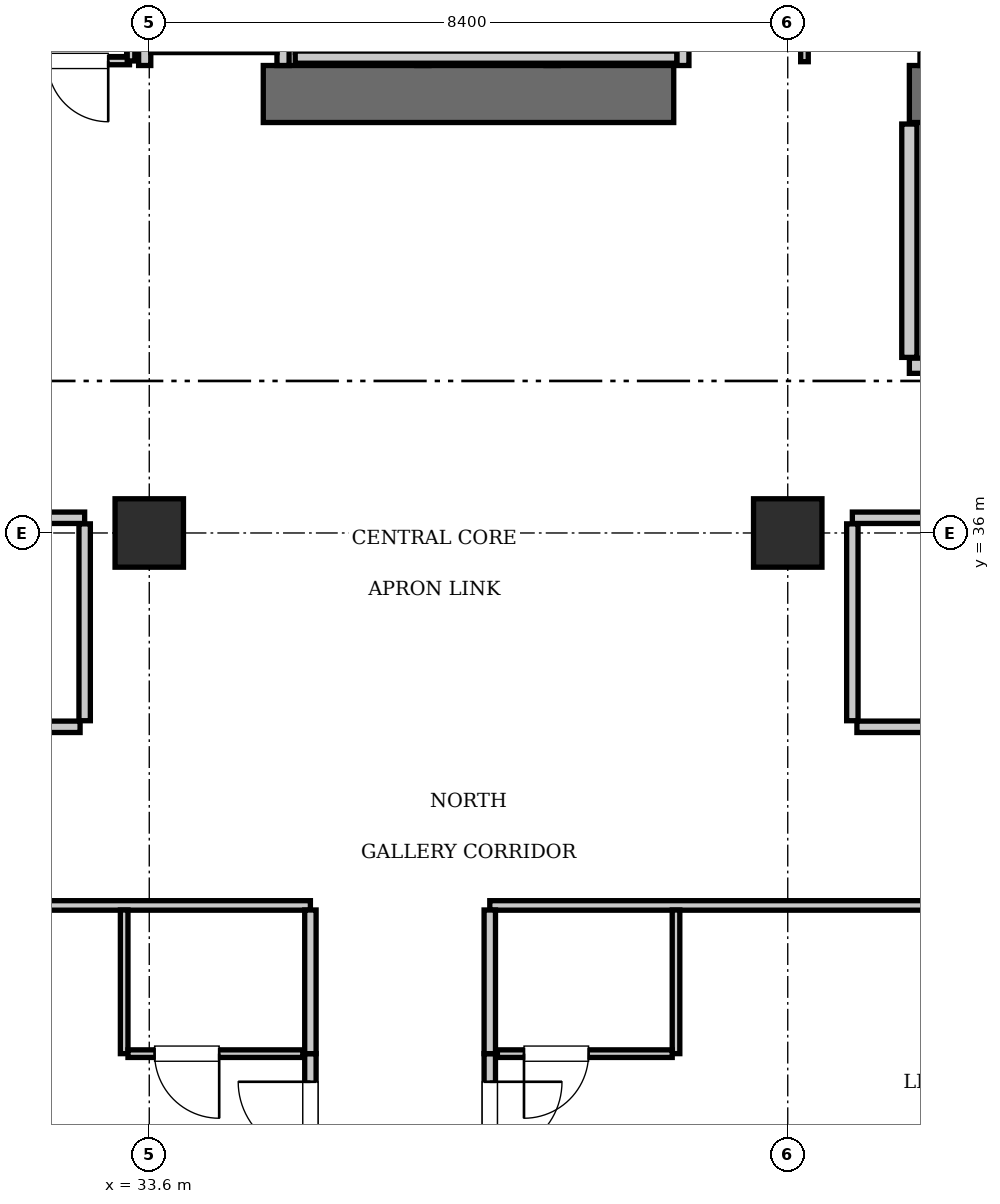
"""IFC4 building model, lengths in metres.
Left out: names, types, materials, properties, quantities, classifications, styles, units other than length and angle.
Written with IfcOpenShell. Run it as: python <this file> out.ifc"""

import sys

from ifc_helpers import new_model, si_unit, direction, frame, frame_2d, origin, origin_2d, place, context, subcontext, project, spatial, rectangle, extrude, element, fill, save


model = new_model("IFC4")
c1 = context("Model", 3, precision=1e-05, world=origin(), true_north=direction((0.0, 1.0)))
c2 = subcontext(c1, "Body", "Model", "MODEL_VIEW")
j1 = project(units=[si_unit("LENGTHUNIT", "METRE"), si_unit("PLANEANGLEUNIT", "RADIAN")], contexts=[c1])
p1 = place(None, origin())
s1 = spatial("IfcSite", under=j1, at=p1, CompositionType="ELEMENT")
p2 = place(p1, origin())
s2 = spatial("IfcBuilding", under=s1, at=p2, CompositionType="ELEMENT")
p3 = place(p2, frame((0.0, 0.0, 189.0)))
s3 = spatial("IfcBuildingStorey", under=s2, at=p3, CompositionType="ELEMENT", Elevation=189.0)
p4 = place(p3, frame((35.1, 41.775, 0.0), z_axis=(0.0, 0.0, 1.0), x_axis=(1.0, 0.0, 0.0)))
e1 = element("IfcWall", 1, at=p4, inside=s3, PredefinedType="SHEAR", context=c2, shape_type="SweptSolid", body=[
    extrude(rectangle(XDim=5.4, YDim=0.75, at=frame_2d((2.7, 0.0))), origin(), (0.0, 0.0, 1.0), 3.85),
])
p5 = place(p3, frame((43.6, 41.775, 0.0), z_axis=(0.0, 0.0, 1.0), x_axis=(1.0, 0.0, 0.0)))
e2 = element("IfcWall", 2, at=p5, inside=s3, PredefinedType="SHEAR", context=c2, shape_type="SweptSolid", body=[
    extrude(rectangle(XDim=6.8, YDim=0.75, at=frame_2d((3.4, 0.0))), origin(), (0.0, 0.0, 1.0), 3.85),
])
p6 = place(p5, frame((3.9, 0.0, 0.0)))
e3 = element("IfcOpeningElement", 3, at=p6, cuts=e2, PredefinedType="OPENING", context=c2, shape_type="SweptSolid", body=[
    extrude(rectangle(XDim=1.15, YDim=2.15, at=frame_2d((0.575, 1.075))), frame((0.0, 0.385, 0.0), z_axis=(0.0, -1.0, 0.0), x_axis=(1.0, 0.0, 0.0)), (0.0, 0.0, 1.0), 0.77),
])
p7 = place(p5, frame((0.55, 0.0, 0.0)))
e4 = element("IfcOpeningElement", 4, at=p7, cuts=e2, PredefinedType="OPENING", context=c2, shape_type="SweptSolid", body=[
    extrude(rectangle(XDim=1.1, YDim=2.2, at=frame_2d((0.55, 1.1))), frame((0.0, 0.385, 0.0), z_axis=(0.0, -1.0, 0.0), x_axis=(1.0, 0.0, 0.0)), (0.0, 0.0, 1.0), 0.77),
])
for number, where, z_axis, x_axis in (
    (5, (33.6, 36.0, 0.0), (0.0, 0.0, 1.0), (1.0, 0.0, 0.0)),
    (6, (42.0, 36.0, 0.0), (0.0, 0.0, 1.0), (1.0, 0.0, 0.0)),
):
    element("IfcColumn", number, at=place(p3, frame(where, z_axis=z_axis, x_axis=x_axis)), inside=s3, PredefinedType="COLUMN", context=c2, shape_type="SweptSolid", body=[
        extrude(rectangle(XDim=0.9, YDim=0.9, at=origin_2d()), origin(), (0.0, 0.0, 1.0), 3.85),
    ])
p8 = place(p3, frame((43.82, 42.15, 0.0), z_axis=(0.0, 0.0, 1.0), x_axis=(0.0, 1.0, 0.0)))
e7 = element("IfcWall", 7, at=p8, inside=s3, PredefinedType="SOLIDWALL", context=c2, shape_type="SweptSolid", body=[
    extrude(rectangle(XDim=2.59, YDim=0.16, at=frame_2d((1.295, 0.0))), origin(), (0.0, 0.0, 1.0), 3.61),
])
for number, where, z_axis, x_axis in (
    (8, (37.2, 42.15, 0.0), (0.0, 0.0, 1.0), (0.0, 1.0, 0.0)),
    (9, (38.9, 42.15, 0.0), (0.0, 0.0, 1.0), (0.0, 1.0, 0.0)),
    (10, (40.62, 42.15, 0.0), (0.0, 0.0, 1.0), (0.0, 1.0, 0.0)),
):
    element("IfcWall", number, at=place(p3, frame(where, z_axis=z_axis, x_axis=x_axis)), inside=s3, PredefinedType="SOLIDWALL", context=c2, shape_type="SweptSolid", body=[
        extrude(rectangle(XDim=2.2, YDim=0.16, at=frame_2d((1.1, 0.0))), origin(), (0.0, 0.0, 1.0), 3.61),
    ])
p9 = place(p3, frame((35.52, 42.26, 0.0), z_axis=(0.0, 0.0, 1.0), x_axis=(1.0, 0.0, 0.0)))
e11 = element("IfcWall", 11, at=p9, inside=s3, PredefinedType="SOLIDWALL", context=c2, shape_type="SweptSolid", body=[
    extrude(rectangle(XDim=5.02, YDim=0.16, at=frame_2d((2.51, 0.0))), origin(), (0.0, 0.0, 1.0), 3.61),
])
for number, where, z_axis, x_axis in (
    (12, (33.54, 42.15, 0.0), (0.0, 0.0, 1.0), (0.0, 1.0, 0.0)),
    (13, (35.36, 42.15, 0.0), (0.0, 0.0, 1.0), (0.0, 1.0, 0.0)),
):
    element("IfcWall", number, at=place(p3, frame(where, z_axis=z_axis, x_axis=x_axis)), inside=s3, PredefinedType="SOLIDWALL", context=c2, shape_type="SweptSolid", body=[
        extrude(rectangle(XDim=2.25, YDim=0.16, at=frame_2d((1.125, 0.0))), origin(), (0.0, 0.0, 1.0), 3.61),
    ])
p10 = place(p3, frame((33.62, 42.4, 0.0), z_axis=(0.0, 0.0, 1.0), x_axis=(1.0, 0.0, 0.0)))
e14 = element("IfcWall", 14, at=p10, inside=s3, PredefinedType="SOLIDWALL", context=c2, shape_type="SweptSolid", body=[
    extrude(rectangle(XDim=1.66, YDim=0.16, at=frame_2d((0.83, 0.0))), origin(), (0.0, 0.0, 1.0), 3.61),
])
p11 = place(p3, frame((43.6, 38.2, 0.0), z_axis=(0.0, 0.0, 1.0), x_axis=(1.0, 0.0, 0.0)))
e15 = element("IfcWall", 15, at=p11, inside=s3, PredefinedType="PARTITIONING", context=c2, shape_type="SweptSolid", body=[
    extrude(rectangle(XDim=5.8, YDim=0.2, at=frame_2d((2.9, 0.0))), origin(), (0.0, 0.0, 1.0), 3.61),
])
p12 = place(p11, frame((2.3, 0.0, 0.0)))
e16 = element("IfcOpeningElement", 16, at=p12, cuts=e15, PredefinedType="OPENING", context=c2, shape_type="SweptSolid", body=[
    extrude(rectangle(XDim=1.15, YDim=2.15, at=frame_2d((0.575, 1.075))), frame((0.0, 0.11, 0.0), z_axis=(0.0, -1.0, 0.0), x_axis=(1.0, 0.0, 0.0)), (0.0, 0.0, 1.0), 0.22),
])
p13 = place(p3, frame((43.6, 38.31, 0.0), z_axis=(0.0, 0.0, 1.0), x_axis=(0.0, 1.0, 0.0)))
e17 = element("IfcWall", 17, at=p13, inside=s3, PredefinedType="PARTITIONING", context=c2, shape_type="SweptSolid", body=[
    extrude(rectangle(XDim=3.07, YDim=0.2, at=frame_2d((1.535, 0.0))), origin(), (0.0, 0.0, 1.0), 3.61),
])
p14 = place(p3, frame((32.02, 42.21, 0.0), z_axis=(0.0, 0.0, 1.0), x_axis=(1.0, 0.0, 0.0)))
e18 = element("IfcWall", 18, at=p14, inside=s3, PredefinedType="PARTITIONING", context=c2, shape_type="SweptSolid", body=[
    extrude(rectangle(XDim=1.32, YDim=0.1, at=frame_2d((0.66, 0.0))), origin(), (0.0, 0.0, 1.0), 3.61),
])
p15 = place(p14, frame((0.24, 0.0, 0.0)))
e19 = element("IfcOpeningElement", 19, at=p15, cuts=e18, PredefinedType="OPENING", context=c2, shape_type="SweptSolid", body=[
    extrude(rectangle(XDim=0.8, YDim=2.05, at=frame_2d((0.4, 1.025))), frame((0.0, 0.06, 0.0), z_axis=(0.0, -1.0, 0.0), x_axis=(1.0, 0.0, 0.0)), (0.0, 0.0, 1.0), 0.12),
])
p16 = place(p3, frame((33.36, 42.21, 0.0), z_axis=(0.0, 0.0, 1.0), x_axis=(0.0, 1.0, 0.0)))
e20 = element("IfcWall", 20, at=p16, inside=s3, PredefinedType="PARTITIONING", context=c2, shape_type="SweptSolid", body=[
    extrude(rectangle(XDim=2.73, YDim=0.1, at=frame_2d((1.365, 0.0))), origin(), (0.0, 0.0, 1.0), 3.61),
])
p17 = place(p3, frame((42.22, 42.2, 0.0), z_axis=(0.0, 0.0, 1.0), x_axis=(0.0, 1.0, 0.0)))
e21 = element("IfcWall", 21, at=p17, inside=s3, PredefinedType="PARTITIONING", context=c2, shape_type="SweptSolid", body=[
    extrude(rectangle(XDim=2.76, YDim=0.1, at=frame_2d((1.38, 0.0))), origin(), (0.0, 0.0, 1.0), 3.61),
])
p18 = place(p17, frame((0.65, 0.0, 0.0)))
e22 = element("IfcOpeningElement", 22, at=p18, cuts=e21, PredefinedType="OPENING", context=c2, shape_type="SweptSolid", body=[
    extrude(rectangle(XDim=0.8, YDim=2.05, at=frame_2d((0.4, 1.025))), frame((0.0, 0.06, 0.0), z_axis=(0.0, -1.0, 0.0), x_axis=(1.0, 0.0, 0.0)), (0.0, 0.0, 1.0), 0.12),
])
p19 = place(p3, frame((28.32, 36.2, 0.0), z_axis=(0.0, 0.0, 1.0), x_axis=(1.0, 0.0, 0.0)))
e23 = element("IfcWall", 23, at=p19, inside=s3, PredefinedType="PARTITIONING", context=c2, shape_type="SweptSolid", body=[
    extrude(rectangle(XDim=4.43, YDim=0.15, at=frame_2d((2.215, 0.0))), origin(), (0.0, 0.0, 1.0), 3.61),
])
p20 = place(p3, frame((32.75, 33.53, 0.0), z_axis=(0.0, 0.0, 1.0), x_axis=(0.0, 1.0, 0.0)))
e24 = element("IfcWall", 24, at=p20, inside=s3, PredefinedType="PARTITIONING", context=c2, shape_type="SweptSolid", body=[
    extrude(rectangle(XDim=2.59, YDim=0.15, at=frame_2d((1.295, 0.0))), origin(), (0.0, 0.0, 1.0), 3.61),
])
p21 = place(p3, frame((28.38, 33.45, 0.0), z_axis=(0.0, 0.0, 1.0), x_axis=(1.0, 0.0, 0.0)))
e25 = element("IfcWall", 25, at=p21, inside=s3, PredefinedType="PARTITIONING", context=c2, shape_type="SweptSolid", body=[
    extrude(rectangle(XDim=4.31, YDim=0.15, at=frame_2d((2.155, 0.0))), origin(), (0.0, 0.0, 1.0), 3.61),
])
p22 = place(p21, frame((1.705, 0.0, 0.0)))
e26 = element("IfcOpeningElement", 26, at=p22, cuts=e25, PredefinedType="OPENING", context=c2, shape_type="SweptSolid", body=[
    extrude(rectangle(XDim=0.9, YDim=2.1, at=frame_2d((0.45, 1.05))), frame((0.0, 0.085, 0.0), z_axis=(0.0, -1.0, 0.0), x_axis=(1.0, 0.0, 0.0)), (0.0, 0.0, 1.0), 0.17),
])
p23 = place(p3, frame((42.85, 36.2, 0.0), z_axis=(0.0, 0.0, 1.0), x_axis=(1.0, 0.0, 0.0)))
e27 = element("IfcWall", 27, at=p23, inside=s3, PredefinedType="PARTITIONING", context=c2, shape_type="SweptSolid", body=[
    extrude(rectangle(XDim=4.43, YDim=0.15, at=frame_2d((2.215, 0.0))), origin(), (0.0, 0.0, 1.0), 3.61),
])
p24 = place(p3, frame((42.85, 33.53, 0.0), z_axis=(0.0, 0.0, 1.0), x_axis=(0.0, 1.0, 0.0)))
e28 = element("IfcWall", 28, at=p24, inside=s3, PredefinedType="PARTITIONING", context=c2, shape_type="SweptSolid", body=[
    extrude(rectangle(XDim=2.59, YDim=0.15, at=frame_2d((1.295, 0.0))), origin(), (0.0, 0.0, 1.0), 3.61),
])
p25 = place(p3, frame((42.91, 33.45, 0.0), z_axis=(0.0, 0.0, 1.0), x_axis=(1.0, 0.0, 0.0)))
e29 = element("IfcWall", 29, at=p25, inside=s3, PredefinedType="PARTITIONING", context=c2, shape_type="SweptSolid", body=[
    extrude(rectangle(XDim=4.31, YDim=0.15, at=frame_2d((2.155, 0.0))), origin(), (0.0, 0.0, 1.0), 3.61),
])
p26 = place(p25, frame((1.705, 0.0, 0.0)))
e30 = element("IfcOpeningElement", 30, at=p26, cuts=e29, PredefinedType="OPENING", context=c2, shape_type="SweptSolid", body=[
    extrude(rectangle(XDim=0.9, YDim=2.1, at=frame_2d((0.45, 1.05))), frame((0.0, 0.085, 0.0), z_axis=(0.0, -1.0, 0.0), x_axis=(1.0, 0.0, 0.0)), (0.0, 0.0, 1.0), 0.17),
])
p27 = place(p3, frame((13.2, 31.1, 0.0), z_axis=(0.0, 0.0, 1.0), x_axis=(1.0, 0.0, 0.0)))
e31 = element("IfcWall", 31, at=p27, inside=s3, PredefinedType="PARTITIONING", context=c2, shape_type="SweptSolid", body=[
    extrude(rectangle(XDim=22.52, YDim=0.125, at=frame_2d((11.26, 0.0))), origin(), (0.0, 0.0, 1.0), 3.61),
])
p28 = place(p3, frame((38.08, 31.1, 0.0), z_axis=(0.0, 0.0, 1.0), x_axis=(1.0, 0.0, 0.0)))
e32 = element("IfcWall", 32, at=p28, inside=s3, PredefinedType="PARTITIONING", context=c2, shape_type="SweptSolid", body=[
    extrude(rectangle(XDim=24.32, YDim=0.125, at=frame_2d((12.16, 0.0))), origin(), (0.0, 0.0, 1.0), 3.61),
])
p29 = place(p3, frame((35.72, 27.46, 0.0), z_axis=(0.0, 0.0, 1.0), x_axis=(0.0, 1.0, 0.0)))
e33 = element("IfcWall", 33, at=p29, inside=s3, PredefinedType="PARTITIONING", context=c2, shape_type="SweptSolid", body=[
    extrude(rectangle(XDim=1.69, YDim=0.15, at=frame_2d((0.845, 0.0))), origin(), (0.0, 0.0, 1.0), 3.61),
])
p30 = place(p29, frame((0.37, 0.0, 0.0)))
e34 = element("IfcOpeningElement", 34, at=p30, cuts=e33, PredefinedType="OPENING", context=c2, shape_type="SweptSolid", body=[
    extrude(rectangle(XDim=0.95, YDim=2.15, at=frame_2d((0.475, 1.075))), frame((0.0, 0.085, 0.0), z_axis=(0.0, -1.0, 0.0), x_axis=(1.0, 0.0, 0.0)), (0.0, 0.0, 1.0), 0.17),
])
p31 = place(p3, frame((35.72, 29.15, 0.0), z_axis=(0.0, 0.0, 1.0), x_axis=(0.0, 1.0, 0.0)))
e35 = element("IfcWall", 35, at=p31, inside=s3, PredefinedType="PARTITIONING", context=c2, shape_type="SweptSolid", body=[
    extrude(rectangle(XDim=1.89, YDim=0.15, at=frame_2d((0.945, 0.0))), origin(), (0.0, 0.0, 1.0), 3.61),
])
p32 = place(p3, frame((33.27, 29.15, 0.0), z_axis=(0.0, 0.0, 1.0), x_axis=(0.0, 1.0, 0.0)))
e36 = element("IfcWall", 36, at=p32, inside=s3, PredefinedType="PARTITIONING", context=c2, shape_type="SweptSolid", body=[
    extrude(rectangle(XDim=1.89, YDim=0.1, at=frame_2d((0.945, 0.0))), origin(), (0.0, 0.0, 1.0), 3.61),
])
p33 = place(p3, frame((33.32, 29.15, 0.0), z_axis=(0.0, 0.0, 1.0), x_axis=(1.0, 0.0, 0.0)))
e37 = element("IfcWall", 37, at=p33, inside=s3, PredefinedType="PARTITIONING", context=c2, shape_type="SweptSolid", body=[
    extrude(rectangle(XDim=2.3, YDim=0.1, at=frame_2d((1.15, 0.0))), origin(), (0.0, 0.0, 1.0), 3.61),
])
p34 = place(p33, frame((0.35, 0.0, 0.0)))
e38 = element("IfcOpeningElement", 38, at=p34, cuts=e37, PredefinedType="OPENING", context=c2, shape_type="SweptSolid", body=[
    extrude(rectangle(XDim=0.85, YDim=2.1, at=frame_2d((0.425, 1.05))), frame((0.0, 0.06, 0.0), z_axis=(0.0, -1.0, 0.0), x_axis=(1.0, 0.0, 0.0)), (0.0, 0.0, 1.0), 0.12),
])
p35 = place(p3, frame((38.08, 27.46, 0.0), z_axis=(0.0, 0.0, 1.0), x_axis=(0.0, 1.0, 0.0)))
e39 = element("IfcWall", 39, at=p35, inside=s3, PredefinedType="PARTITIONING", context=c2, shape_type="SweptSolid", body=[
    extrude(rectangle(XDim=1.69, YDim=0.15, at=frame_2d((0.845, 0.0))), origin(), (0.0, 0.0, 1.0), 3.61),
])
p36 = place(p35, frame((0.37, 0.0, 0.0)))
e40 = element("IfcOpeningElement", 40, at=p36, cuts=e39, PredefinedType="OPENING", context=c2, shape_type="SweptSolid", body=[
    extrude(rectangle(XDim=0.95, YDim=2.15, at=frame_2d((0.475, 1.075))), frame((0.0, 0.085, 0.0), z_axis=(0.0, -1.0, 0.0), x_axis=(1.0, 0.0, 0.0)), (0.0, 0.0, 1.0), 0.17),
])
p37 = place(p3, frame((38.08, 29.15, 0.0), z_axis=(0.0, 0.0, 1.0), x_axis=(0.0, 1.0, 0.0)))
e41 = element("IfcWall", 41, at=p37, inside=s3, PredefinedType="PARTITIONING", context=c2, shape_type="SweptSolid", body=[
    extrude(rectangle(XDim=1.89, YDim=0.15, at=frame_2d((0.945, 0.0))), origin(), (0.0, 0.0, 1.0), 3.61),
])
p38 = place(p3, frame((40.53, 29.15, 0.0), z_axis=(0.0, 0.0, 1.0), x_axis=(0.0, 1.0, 0.0)))
e42 = element("IfcWall", 42, at=p38, inside=s3, PredefinedType="PARTITIONING", context=c2, shape_type="SweptSolid", body=[
    extrude(rectangle(XDim=1.89, YDim=0.1, at=frame_2d((0.945, 0.0))), origin(), (0.0, 0.0, 1.0), 3.61),
])
p39 = place(p3, frame((38.18, 29.15, 0.0), z_axis=(0.0, 0.0, 1.0), x_axis=(1.0, 0.0, 0.0)))
e43 = element("IfcWall", 43, at=p39, inside=s3, PredefinedType="PARTITIONING", context=c2, shape_type="SweptSolid", body=[
    extrude(rectangle(XDim=2.3, YDim=0.1, at=frame_2d((1.15, 0.0))), origin(), (0.0, 0.0, 1.0), 3.61),
])
p40 = place(p39, frame((0.35, 0.0, 0.0)))
e44 = element("IfcOpeningElement", 44, at=p40, cuts=e43, PredefinedType="OPENING", context=c2, shape_type="SweptSolid", body=[
    extrude(rectangle(XDim=0.85, YDim=2.1, at=frame_2d((0.425, 1.05))), frame((0.0, 0.06, 0.0), z_axis=(0.0, -1.0, 0.0), x_axis=(1.0, 0.0, 0.0)), (0.0, 0.0, 1.0), 0.12),
])
p41 = place(p15, frame((0.8, 0.0, 0.0), z_axis=(0.0, 0.0, 1.0), x_axis=(-1.0, 0.0, 0.0)))
e45 = element("IfcDoor", 45, at=p41, inside=s3, OperationType="SINGLE_SWING_LEFT", PredefinedType="DOOR", context=c2, shape_type="SweptSolid", body=[
    extrude(rectangle(XDim=0.8, YDim=2.05, at=frame_2d((0.4, 1.025))), frame((0.0, 0.025, 0.0), z_axis=(0.0, -1.0, 0.0), x_axis=(1.0, 0.0, 0.0)), (0.0, 0.0, 1.0), 0.05),
])
fill(e19, e45)
p42 = place(p34, frame((0.85, 0.0, 0.0), z_axis=(0.0, 0.0, 1.0), x_axis=(-1.0, 0.0, 0.0)))
e46 = element("IfcDoor", 46, at=p42, inside=s3, OperationType="SINGLE_SWING_LEFT", PredefinedType="DOOR", context=c2, shape_type="SweptSolid", body=[
    extrude(rectangle(XDim=0.85, YDim=2.1, at=frame_2d((0.425, 1.05))), frame((0.0, 0.025, 0.0), z_axis=(0.0, -1.0, 0.0), x_axis=(1.0, 0.0, 0.0)), (0.0, 0.0, 1.0), 0.05),
])
fill(e38, e46)
p43 = place(p30, origin())
e47 = element("IfcDoor", 47, at=p43, inside=s3, OperationType="SINGLE_SWING_RIGHT", PredefinedType="DOOR", context=c2, shape_type="SweptSolid", body=[
    extrude(rectangle(XDim=0.95, YDim=2.15, at=frame_2d((0.475, 1.075))), frame((0.0, 0.025, 0.0), z_axis=(0.0, -1.0, 0.0), x_axis=(1.0, 0.0, 0.0)), (0.0, 0.0, 1.0), 0.05),
])
fill(e34, e47)
p44 = place(p40, frame((0.85, 0.0, 0.0), z_axis=(0.0, 0.0, 1.0), x_axis=(-1.0, 0.0, 0.0)))
e48 = element("IfcDoor", 48, at=p44, inside=s3, OperationType="SINGLE_SWING_RIGHT", PredefinedType="DOOR", context=c2, shape_type="SweptSolid", body=[
    extrude(rectangle(XDim=0.85, YDim=2.1, at=frame_2d((0.425, 1.05))), frame((0.0, 0.025, 0.0), z_axis=(0.0, -1.0, 0.0), x_axis=(1.0, 0.0, 0.0)), (0.0, 0.0, 1.0), 0.05),
])
fill(e44, e48)
p45 = place(p36, frame((0.95, 0.0, 0.0), z_axis=(0.0, 0.0, 1.0), x_axis=(-1.0, 0.0, 0.0)))
e49 = element("IfcDoor", 49, at=p45, inside=s3, OperationType="SINGLE_SWING_LEFT", PredefinedType="DOOR", context=c2, shape_type="SweptSolid", body=[
    extrude(rectangle(XDim=0.95, YDim=2.15, at=frame_2d((0.475, 1.075))), frame((0.0, 0.025, 0.0), z_axis=(0.0, -1.0, 0.0), x_axis=(1.0, 0.0, 0.0)), (0.0, 0.0, 1.0), 0.05),
])
fill(e40, e49)
save(model, sys.argv[1])
